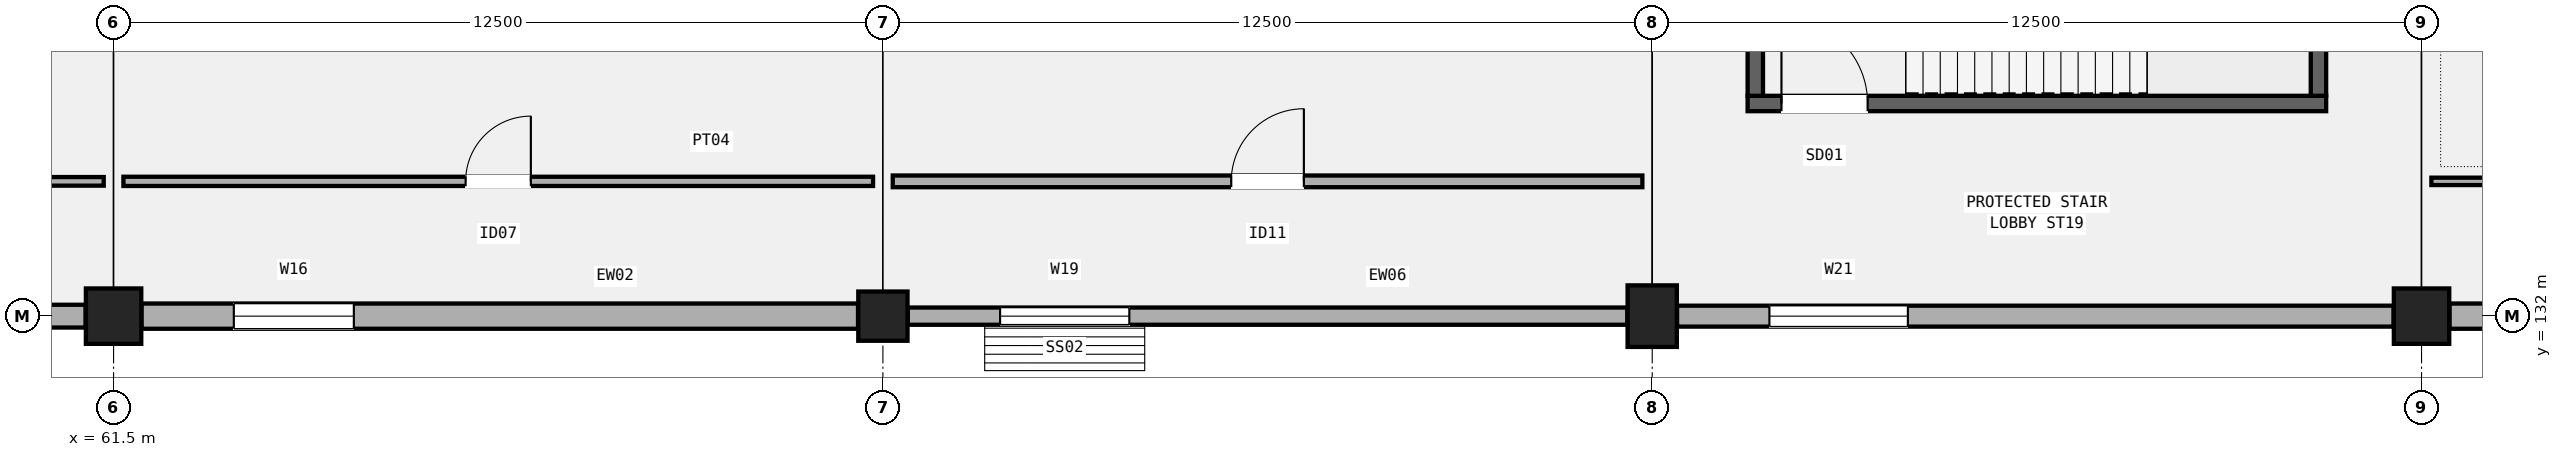
"""IFC4 building model, lengths in metres.
Left out: names, types, materials, properties, quantities, classifications, styles, units other than length and angle.
Written with IfcOpenShell. Run it as: python <this file> out.ifc"""

import sys

from ifc_helpers import new_model, si_unit, direction, frame, frame_2d, origin, origin_2d, place, context, subcontext, project, spatial, rectangle, extrude, element, fill, save


model = new_model("IFC4")
c1 = context("Model", 3, precision=1e-05, world=origin(), true_north=direction((0.0, 1.0)))
c2 = subcontext(c1, "Body", "Model", "MODEL_VIEW")
j1 = project(units=[si_unit("LENGTHUNIT", "METRE"), si_unit("PLANEANGLEUNIT", "RADIAN")], contexts=[c1])
p1 = place(None, origin())
s1 = spatial("IfcSite", under=j1, at=p1, CompositionType="ELEMENT")
p2 = place(p1, origin())
s2 = spatial("IfcBuilding", under=s1, at=p2, CompositionType="ELEMENT")
p3 = place(p2, frame((0.0, 0.0, 10.2)))
s3 = spatial("IfcBuildingStorey", under=s2, at=p3, CompositionType="ELEMENT", Elevation=10.2)
p4 = place(p3, frame((61.5, 132.0, 0.0), z_axis=(0.0, 0.0, 1.0), x_axis=(1.0, 0.0, 0.0)))
e1 = element("IfcColumn", 1, at=p4, inside=s3, PredefinedType="COLUMN", context=c2, shape_type="SweptSolid", body=[
    extrude(rectangle(XDim=0.9, YDim=0.9, at=origin_2d()), origin(), (0.0, 0.0, 1.0), 5.1),
])
p5 = place(p3, frame((74.0, 132.0, 0.0), z_axis=(0.0, 0.0, 1.0), x_axis=(1.0, 0.0, 0.0)))
e2 = element("IfcColumn", 2, at=p5, inside=s3, PredefinedType="COLUMN", context=c2, shape_type="SweptSolid", body=[
    extrude(rectangle(XDim=0.8, YDim=0.8, at=origin_2d()), origin(), (0.0, 0.0, 1.0), 5.1),
])
p6 = place(p3, frame((86.5, 132.0, 0.0), z_axis=(0.0, 0.0, 1.0), x_axis=(1.0, 0.0, 0.0)))
e3 = element("IfcColumn", 3, at=p6, inside=s3, PredefinedType="COLUMN", context=c2, shape_type="SweptSolid", body=[
    extrude(rectangle(XDim=0.8, YDim=1.0, at=origin_2d()), origin(), (0.0, 0.0, 1.0), 5.1),
])
p7 = place(p3, frame((99.0, 132.0, 0.0), z_axis=(0.0, 0.0, 1.0), x_axis=(1.0, 0.0, 0.0)))
e4 = element("IfcColumn", 4, at=p7, inside=s3, PredefinedType="COLUMN", context=c2, shape_type="SweptSolid", body=[
    extrude(rectangle(XDim=0.9, YDim=0.9, at=origin_2d()), origin(), (0.0, 0.0, 1.0), 5.1),
])
p8 = place(p3, frame((60.396, 132.0, 0.0), z_axis=(0.0, 0.0, 1.0), x_axis=(1.0, 0.0, 0.0)))
e5 = element("IfcWall", 5, at=p8, inside=s3, PredefinedType="SOLIDWALL", context=c2, shape_type="SweptSolid", body=[
    extrude(rectangle(XDim=0.65, YDim=0.37, at=frame_2d((0.325, 0.0))), origin(), (0.0, 0.0, 1.0), 4.02),
])
p9 = place(p3, frame((61.954, 132.0, 0.0), z_axis=(0.0, 0.0, 1.0), x_axis=(1.0, 0.0, 0.0)))
e6 = element("IfcWall", 6, at=p9, inside=s3, PredefinedType="SOLIDWALL", context=c2, shape_type="SweptSolid", body=[
    extrude(rectangle(XDim=11.642, YDim=0.41, at=frame_2d((5.821, 0.0))), origin(), (0.0, 0.0, 1.0), 4.12),
])
p10 = place(p9, frame((1.5, 0.0, 0.95)))
e7 = element("IfcOpeningElement", 7, at=p10, cuts=e6, PredefinedType="OPENING", context=c2, shape_type="SweptSolid", body=[
    extrude(rectangle(XDim=1.95, YDim=1.9, at=frame_2d((0.975, 0.95))), frame((0.0, 0.215, 0.0), z_axis=(0.0, -1.0, 0.0), x_axis=(1.0, 0.0, 0.0)), (0.0, 0.0, 1.0), 0.43),
])
p11 = place(p3, frame((74.404, 132.0, 0.0), z_axis=(0.0, 0.0, 1.0), x_axis=(1.0, 0.0, 0.0)))
e8 = element("IfcWall", 8, at=p11, inside=s3, PredefinedType="SOLIDWALL", context=c2, shape_type="SweptSolid", body=[
    extrude(rectangle(XDim=11.692, YDim=0.28, at=frame_2d((5.846, 0.0))), origin(), (0.0, 0.0, 1.0), 4.22),
])
p12 = place(p11, frame((1.5, 0.0, 0.95)))
e9 = element("IfcOpeningElement", 9, at=p12, cuts=e8, PredefinedType="OPENING", context=c2, shape_type="SweptSolid", body=[
    extrude(rectangle(XDim=2.1, YDim=2.25, at=frame_2d((1.05, 1.125))), frame((0.0, 0.15, 0.0), z_axis=(0.0, -1.0, 0.0), x_axis=(1.0, 0.0, 0.0)), (0.0, 0.0, 1.0), 0.3),
])
p13 = place(p3, frame((86.904, 132.0, 0.0), z_axis=(0.0, 0.0, 1.0), x_axis=(1.0, 0.0, 0.0)))
e10 = element("IfcWall", 10, at=p13, inside=s3, PredefinedType="SOLIDWALL", context=c2, shape_type="SweptSolid", body=[
    extrude(rectangle(XDim=11.642, YDim=0.34, at=frame_2d((5.821, 0.0))), origin(), (0.0, 0.0, 1.0), 4.02),
])
p14 = place(p13, frame((1.5, 0.0, 0.95)))
e11 = element("IfcOpeningElement", 11, at=p14, cuts=e10, PredefinedType="OPENING", context=c2, shape_type="SweptSolid", body=[
    extrude(rectangle(XDim=2.25, YDim=1.8, at=frame_2d((1.125, 0.9))), frame((0.0, 0.18, 0.0), z_axis=(0.0, -1.0, 0.0), x_axis=(1.0, 0.0, 0.0)), (0.0, 0.0, 1.0), 0.36),
])
p15 = place(p3, frame((99.454, 132.0, 0.0), z_axis=(0.0, 0.0, 1.0), x_axis=(1.0, 0.0, 0.0)))
e12 = element("IfcWall", 12, at=p15, inside=s3, PredefinedType="SOLIDWALL", context=c2, shape_type="SweptSolid", body=[
    extrude(rectangle(XDim=12.142, YDim=0.41, at=frame_2d((6.071, 0.0))), origin(), (0.0, 0.0, 1.0), 4.12),
])
p16 = place(p15, frame((1.5, 0.0, 0.95)))
e13 = element("IfcOpeningElement", 13, at=p16, cuts=e12, PredefinedType="OPENING", context=c2, shape_type="SweptSolid", body=[
    extrude(rectangle(XDim=2.4, YDim=1.65, at=frame_2d((1.2, 0.825))), frame((0.0, 0.215, 0.0), z_axis=(0.0, -1.0, 0.0), x_axis=(1.0, 0.0, 0.0)), (0.0, 0.0, 1.0), 0.43),
])
p17 = place(p3, frame((88.05, 135.455, 0.0), z_axis=(0.0, 0.0, 1.0), x_axis=(1.0, 0.0, 0.0)))
e14 = element("IfcWall", 14, at=p17, inside=s3, PredefinedType="SHEAR", context=c2, shape_type="SweptSolid", body=[
    extrude(rectangle(XDim=9.4, YDim=0.25, at=frame_2d((4.7, 0.0))), origin(), (0.0, 0.0, 1.0), 4.82),
])
p18 = place(p17, frame((0.55, 0.0, 0.0)))
e15 = element("IfcOpeningElement", 15, at=p18, cuts=e14, PredefinedType="OPENING", context=c2, shape_type="SweptSolid", body=[
    extrude(rectangle(XDim=1.4, YDim=2.15, at=frame_2d((0.7, 1.075))), frame((0.0, 0.135, 0.0), z_axis=(0.0, -1.0, 0.0), x_axis=(1.0, 0.0, 0.0)), (0.0, 0.0, 1.0), 0.27),
])
for number, where, z_axis, x_axis in (
    (16, (88.175, 135.58, 0.0), (0.0, 0.0, 1.0), (0.0, 1.0, 0.0)),
    (17, (97.325, 135.58, 0.0), (0.0, 0.0, 1.0), (0.0, 1.0, 0.0)),
):
    element("IfcWall", number, at=place(p3, frame(where, z_axis=z_axis, x_axis=x_axis)), inside=s3, PredefinedType="SHEAR", context=c2, shape_type="SweptSolid", body=[
        extrude(rectangle(XDim=4.84, YDim=0.25, at=frame_2d((2.42, 0.0))), origin(), (0.0, 0.0, 1.0), 4.82),
    ])
p19 = place(p3, frame((51.12, 134.19, 0.0), z_axis=(0.0, 0.0, 1.0), x_axis=(1.0, 0.0, 0.0)))
e18 = element("IfcWall", 18, at=p19, inside=s3, PredefinedType="PARTITIONING", context=c2, shape_type="SweptSolid", body=[
    extrude(rectangle(XDim=10.22, YDim=0.14, at=frame_2d((5.11, 0.0))), origin(), (0.0, 0.0, 1.0), 4.22),
])
p20 = place(p19, frame((4.62, 0.0, 0.0)))
e19 = element("IfcOpeningElement", 19, at=p20, cuts=e18, PredefinedType="OPENING", context=c2, shape_type="SweptSolid", body=[
    extrude(rectangle(XDim=0.98, YDim=2.1, at=frame_2d((0.49, 1.05))), frame((0.0, 0.08, 0.0), z_axis=(0.0, -1.0, 0.0), x_axis=(1.0, 0.0, 0.0)), (0.0, 0.0, 1.0), 0.16),
])
p21 = place(p3, frame((61.66, 134.19, 0.0), z_axis=(0.0, 0.0, 1.0), x_axis=(1.0, 0.0, 0.0)))
e20 = element("IfcWall", 20, at=p21, inside=s3, PredefinedType="PARTITIONING", context=c2, shape_type="SweptSolid", body=[
    extrude(rectangle(XDim=12.18, YDim=0.15, at=frame_2d((6.09, 0.0))), origin(), (0.0, 0.0, 1.0), 4.22),
])
p22 = place(p21, frame((5.56, 0.0, 0.0)))
e21 = element("IfcOpeningElement", 21, at=p22, cuts=e20, PredefinedType="OPENING", context=c2, shape_type="SweptSolid", body=[
    extrude(rectangle(XDim=1.06, YDim=2.15, at=frame_2d((0.53, 1.075))), frame((0.0, 0.085, 0.0), z_axis=(0.0, -1.0, 0.0), x_axis=(1.0, 0.0, 0.0)), (0.0, 0.0, 1.0), 0.17),
])
p23 = place(p3, frame((74.16, 134.19, 0.0), z_axis=(0.0, 0.0, 1.0), x_axis=(1.0, 0.0, 0.0)))
e22 = element("IfcWall", 22, at=p23, inside=s3, PredefinedType="PARTITIONING", context=c2, shape_type="SweptSolid", body=[
    extrude(rectangle(XDim=12.18, YDim=0.19, at=frame_2d((6.09, 0.0))), origin(), (0.0, 0.0, 1.0), 4.22),
])
p24 = place(p23, frame((5.5, 0.0, 0.0)))
e23 = element("IfcOpeningElement", 23, at=p24, cuts=e22, PredefinedType="OPENING", context=c2, shape_type="SweptSolid", body=[
    extrude(rectangle(XDim=1.18, YDim=2.2, at=frame_2d((0.59, 1.1))), frame((0.0, 0.105, 0.0), z_axis=(0.0, -1.0, 0.0), x_axis=(1.0, 0.0, 0.0)), (0.0, 0.0, 1.0), 0.21),
])
p25 = place(p3, frame((99.16, 134.19, 0.0), z_axis=(0.0, 0.0, 1.0), x_axis=(1.0, 0.0, 0.0)))
e24 = element("IfcWall", 24, at=p25, inside=s3, PredefinedType="PARTITIONING", context=c2, shape_type="SweptSolid", body=[
    extrude(rectangle(XDim=12.68, YDim=0.12, at=frame_2d((6.34, 0.0))), origin(), (0.0, 0.0, 1.0), 4.22),
])
p26 = place(p25, frame((5.62, 0.0, 0.0)))
e25 = element("IfcOpeningElement", 25, at=p26, cuts=e24, PredefinedType="OPENING", context=c2, shape_type="SweptSolid", body=[
    extrude(rectangle(XDim=1.44, YDim=2.26, at=frame_2d((0.72, 1.13))), frame((0.0, 0.07, 0.0), z_axis=(0.0, -1.0, 0.0), x_axis=(1.0, 0.0, 0.0)), (0.0, 0.0, 1.0), 0.14),
])
p27 = place(p10, origin())
e26 = element("IfcWindow", 26, at=p27, inside=s3, PartitioningType="SINGLE_PANEL", PredefinedType="WINDOW", context=c2, shape_type="SweptSolid", body=[
    extrude(rectangle(XDim=1.95, YDim=1.9, at=frame_2d((0.975, 0.95))), frame((0.0, 0.03, 0.0), z_axis=(0.0, -1.0, 0.0), x_axis=(1.0, 0.0, 0.0)), (0.0, 0.0, 1.0), 0.06),
])
fill(e7, e26)
p28 = place(p12, origin())
e27 = element("IfcWindow", 27, at=p28, inside=s3, PartitioningType="SINGLE_PANEL", PredefinedType="WINDOW", context=c2, shape_type="SweptSolid", body=[
    extrude(rectangle(XDim=2.1, YDim=2.25, at=frame_2d((1.05, 1.125))), frame((0.0, 0.03, 0.0), z_axis=(0.0, -1.0, 0.0), x_axis=(1.0, 0.0, 0.0)), (0.0, 0.0, 1.0), 0.06),
])
fill(e9, e27)
p29 = place(p14, origin())
e28 = element("IfcWindow", 28, at=p29, inside=s3, PartitioningType="SINGLE_PANEL", PredefinedType="WINDOW", context=c2, shape_type="SweptSolid", body=[
    extrude(rectangle(XDim=2.25, YDim=1.8, at=frame_2d((1.125, 0.9))), frame((0.0, 0.03, 0.0), z_axis=(0.0, -1.0, 0.0), x_axis=(1.0, 0.0, 0.0)), (0.0, 0.0, 1.0), 0.06),
])
fill(e11, e28)
p30 = place(p18, origin())
e29 = element("IfcDoor", 29, at=p30, inside=s3, OperationType="SINGLE_SWING_LEFT", PredefinedType="DOOR", context=c2, shape_type="SweptSolid", body=[
    extrude(rectangle(XDim=1.4, YDim=2.15, at=frame_2d((0.7, 1.075))), frame((0.0, 0.025, 0.0), z_axis=(0.0, -1.0, 0.0), x_axis=(1.0, 0.0, 0.0)), (0.0, 0.0, 1.0), 0.05),
])
fill(e15, e29)
p31 = place(p22, origin())
e30 = element("IfcDoor", 30, at=p31, inside=s3, OperationType="SINGLE_SWING_RIGHT", PredefinedType="DOOR", context=c2, shape_type="SweptSolid", body=[
    extrude(rectangle(XDim=1.06, YDim=2.15, at=frame_2d((0.53, 1.075))), frame((0.0, 0.025, 0.0), z_axis=(0.0, -1.0, 0.0), x_axis=(1.0, 0.0, 0.0)), (0.0, 0.0, 1.0), 0.05),
])
fill(e21, e30)
p32 = place(p24, origin())
e31 = element("IfcDoor", 31, at=p32, inside=s3, OperationType="SINGLE_SWING_RIGHT", PredefinedType="DOOR", context=c2, shape_type="SweptSolid", body=[
    extrude(rectangle(XDim=1.18, YDim=2.2, at=frame_2d((0.59, 1.1))), frame((0.0, 0.025, 0.0), z_axis=(0.0, -1.0, 0.0), x_axis=(1.0, 0.0, 0.0)), (0.0, 0.0, 1.0), 0.05),
])
fill(e23, e31)
save(model, sys.argv[1])
